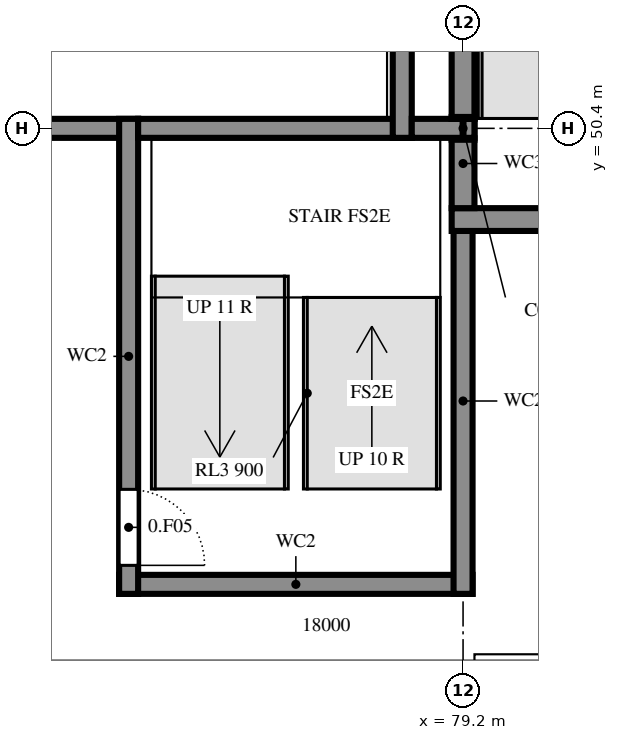
"""IFC4 building model, lengths in metres.
Left out: names, types, materials, properties, quantities, classifications, styles, units other than length and angle.
Written with IfcOpenShell. Run it as: python <this file> out.ifc"""

import sys

from ifc_helpers import new_model, si_unit, direction, frame, frame_2d, origin, origin_2d, place, context, subcontext, project, spatial, rectangle, i_section, extrude, element, fill, save


model = new_model("IFC4")
c1 = context("Model", 3, precision=1e-05, world=origin(), true_north=direction((0.0, 1.0)))
c2 = subcontext(c1, "Body", "Model", "MODEL_VIEW")
j1 = project(units=[si_unit("LENGTHUNIT", "METRE"), si_unit("PLANEANGLEUNIT", "RADIAN")], contexts=[c1])
p1 = place(None, origin())
s1 = spatial("IfcSite", under=j1, at=p1, CompositionType="ELEMENT")
p2 = place(p1, origin())
s2 = spatial("IfcBuilding", under=s1, at=p2, CompositionType="ELEMENT")
p3 = place(p2, origin())
s3 = spatial("IfcBuildingStorey", under=s2, at=p3, CompositionType="ELEMENT", Elevation=0.0)
p4 = place(p3, frame((79.2, 50.4, -0.3), z_axis=(0.0, 0.0, 1.0), x_axis=(1.0, 0.0, 0.0)))
e1 = element("IfcColumn", 1, at=p4, inside=s3, PredefinedType="COLUMN", context=c2, shape_type="SweptSolid", body=[
    extrude(i_section(OverallWidth=0.3, OverallDepth=0.3, WebThickness=0.011, FlangeThickness=0.019, FilletRadius=0.027, at=origin_2d()), origin(), (0.0, 0.0, 1.0), 3.9),
])
p5 = place(p3, frame((74.675, 44.4, 0.0), z_axis=(0.0, 0.0, 1.0), x_axis=(1.0, 0.0, 0.0)))
e2 = element("IfcWall", 2, at=p5, inside=s3, PredefinedType="SHEAR", context=c2, shape_type="SweptSolid", body=[
    extrude(rectangle(XDim=4.65, YDim=0.25, at=frame_2d((2.325, 0.0))), origin(), (0.0, 0.0, 1.0), 3.6),
])
p6 = place(p3, frame((79.2, 44.275, 0.0), z_axis=(0.0, 0.0, 1.0), x_axis=(0.0, 1.0, 0.0)))
e3 = element("IfcWall", 3, at=p6, inside=s3, PredefinedType="SHEAR", context=c2, shape_type="SweptSolid", body=[
    extrude(rectangle(XDim=5.075, YDim=0.25, at=frame_2d((2.538, 0.0))), origin(), (0.0, 0.0, 1.0), 3.6),
])
p7 = place(p3, frame((79.05, 49.2, 0.0), z_axis=(0.0, 0.0, 1.0), x_axis=(1.0, 0.0, 0.0)))
e4 = element("IfcWall", 4, at=p7, inside=s3, PredefinedType="SHEAR", context=c2, shape_type="SweptSolid", body=[
    extrude(rectangle(XDim=5.3, YDim=0.3, at=frame_2d((2.65, 0.0))), origin(), (0.0, 0.0, 1.0), 3.6),
])
p8 = place(p7, frame((2.1, 0.0, 0.0)))
e5 = element("IfcOpeningElement", 5, at=p8, cuts=e4, PredefinedType="OPENING", context=c2, shape_type="SweptSolid", body=[
    extrude(rectangle(XDim=1.2, YDim=2.4, at=frame_2d((0.6, 1.2))), frame((0.0, 0.16, 0.0), z_axis=(0.0, -1.0, 0.0), x_axis=(1.0, 0.0, 0.0)), (0.0, 0.0, 1.0), 0.32),
])
p9 = place(p3, frame((79.2, 49.35, 0.0), z_axis=(0.0, 0.0, 1.0), x_axis=(0.0, 1.0, 0.0)))
e6 = element("IfcWall", 6, at=p9, inside=s3, PredefinedType="SHEAR", context=c2, shape_type="SweptSolid", body=[
    extrude(rectangle(XDim=1.175, YDim=0.3, at=frame_2d((0.587, 0.0))), origin(), (0.0, 0.0, 1.0), 3.6),
])
p10 = place(p3, frame((73.525, 50.4, 0.0), z_axis=(0.0, 0.0, 1.0), x_axis=(1.0, 0.0, 0.0)))
e7 = element("IfcWall", 7, at=p10, inside=s3, PredefinedType="SHEAR", context=c2, shape_type="SweptSolid", body=[
    extrude(rectangle(XDim=1.4, YDim=0.25, at=frame_2d((0.7, 0.0))), origin(), (0.0, 0.0, 1.0), 3.6),
])
p11 = place(p3, frame((74.8, 50.525, 0.0), z_axis=(0.0, 0.0, 1.0), x_axis=(0.0, -1.0, 0.0)))
e8 = element("IfcWall", 8, at=p11, inside=s3, PredefinedType="SHEAR", context=c2, shape_type="SweptSolid", body=[
    extrude(rectangle(XDim=6.25, YDim=0.25, at=frame_2d((3.125, 0.0))), origin(), (0.0, 0.0, 1.0), 3.6),
])
p12 = place(p11, frame((4.875, 0.0, 0.0)))
e9 = element("IfcOpeningElement", 9, at=p12, cuts=e8, PredefinedType="OPENING", context=c2, shape_type="SweptSolid", body=[
    extrude(rectangle(XDim=1.0, YDim=2.4, at=frame_2d((0.5, 1.2))), frame((0.0, 0.135, 0.0), z_axis=(0.0, -1.0, 0.0), x_axis=(1.0, 0.0, 0.0)), (0.0, 0.0, 1.0), 0.27),
])
p13 = place(p3, frame((78.525, 50.4, 0.0), z_axis=(0.0, 0.0, 1.0), x_axis=(-1.0, 0.0, 0.0)))
e10 = element("IfcWall", 10, at=p13, inside=s3, PredefinedType="SHEAR", context=c2, shape_type="SweptSolid", body=[
    extrude(rectangle(XDim=3.6, YDim=0.25, at=frame_2d((1.8, 0.0))), origin(), (0.0, 0.0, 1.0), 3.6),
])
p14 = place(p3, frame((78.4, 50.275, 0.0), z_axis=(0.0, 0.0, 1.0), x_axis=(0.0, 1.0, 0.0)))
e11 = element("IfcWall", 11, at=p14, inside=s3, PredefinedType="SHEAR", context=c2, shape_type="SweptSolid", body=[
    extrude(rectangle(XDim=6.75, YDim=0.25, at=frame_2d((3.375, 0.0))), origin(), (0.0, 0.0, 1.0), 3.6),
])
p15 = place(p3, frame((79.35, 50.4, 0.0), z_axis=(0.0, 0.0, 1.0), x_axis=(-1.0, 0.0, 0.0)))
e12 = element("IfcWall", 12, at=p15, inside=s3, PredefinedType="SHEAR", context=c2, shape_type="SweptSolid", body=[
    extrude(rectangle(XDim=0.825, YDim=0.25, at=frame_2d((0.413, 0.0))), origin(), (0.0, 0.0, 1.0), 3.6),
])
p16 = place(p3, frame((79.2, 55.85, 0.0), z_axis=(0.0, 0.0, 1.0), x_axis=(0.0, -1.0, 0.0)))
e13 = element("IfcWall", 13, at=p16, inside=s3, PredefinedType="SHEAR", context=c2, shape_type="SweptSolid", body=[
    extrude(rectangle(XDim=5.325, YDim=0.3, at=frame_2d((2.663, 0.0))), origin(), (0.0, 0.0, 1.0), 3.6),
])
p17 = place(p3, frame((79.35, 43.2, 0.0), z_axis=(0.0, 0.0, 1.0), x_axis=(1.0, 0.0, 0.0)))
e14 = element("IfcWall", 14, at=p17, inside=s3, PredefinedType="SOLIDWALL", context=c2, shape_type="SweptSolid", body=[
    extrude(rectangle(XDim=6.9, YDim=0.56, at=frame_2d((3.45, 0.0))), origin(), (0.0, 0.0, 1.0), 3.12),
])
p18 = place(p17, frame((2.25, 0.0, 0.015)))
e15 = element("IfcOpeningElement", 15, at=p18, cuts=e14, PredefinedType="OPENING", context=c2, shape_type="SweptSolid", body=[
    extrude(rectangle(XDim=2.4, YDim=2.1, at=frame_2d((1.2, 1.05))), frame((0.0, 0.29, 0.0), z_axis=(0.0, -1.0, 0.0), x_axis=(1.0, 0.0, 0.0)), (0.0, 0.0, 1.0), 0.58),
])
p19 = place(p12, origin())
e16 = element("IfcDoor", 16, at=p19, inside=s3, OperationType="SINGLE_SWING_LEFT", PredefinedType="DOOR", context=c2, shape_type="SweptSolid", body=[
    extrude(rectangle(XDim=1.0, YDim=2.4, at=frame_2d((0.5, 1.2))), frame((0.0, 0.025, 0.0), z_axis=(0.0, -1.0, 0.0), x_axis=(1.0, 0.0, 0.0)), (0.0, 0.0, 1.0), 0.05),
])
fill(e9, e16)
save(model, sys.argv[1])
